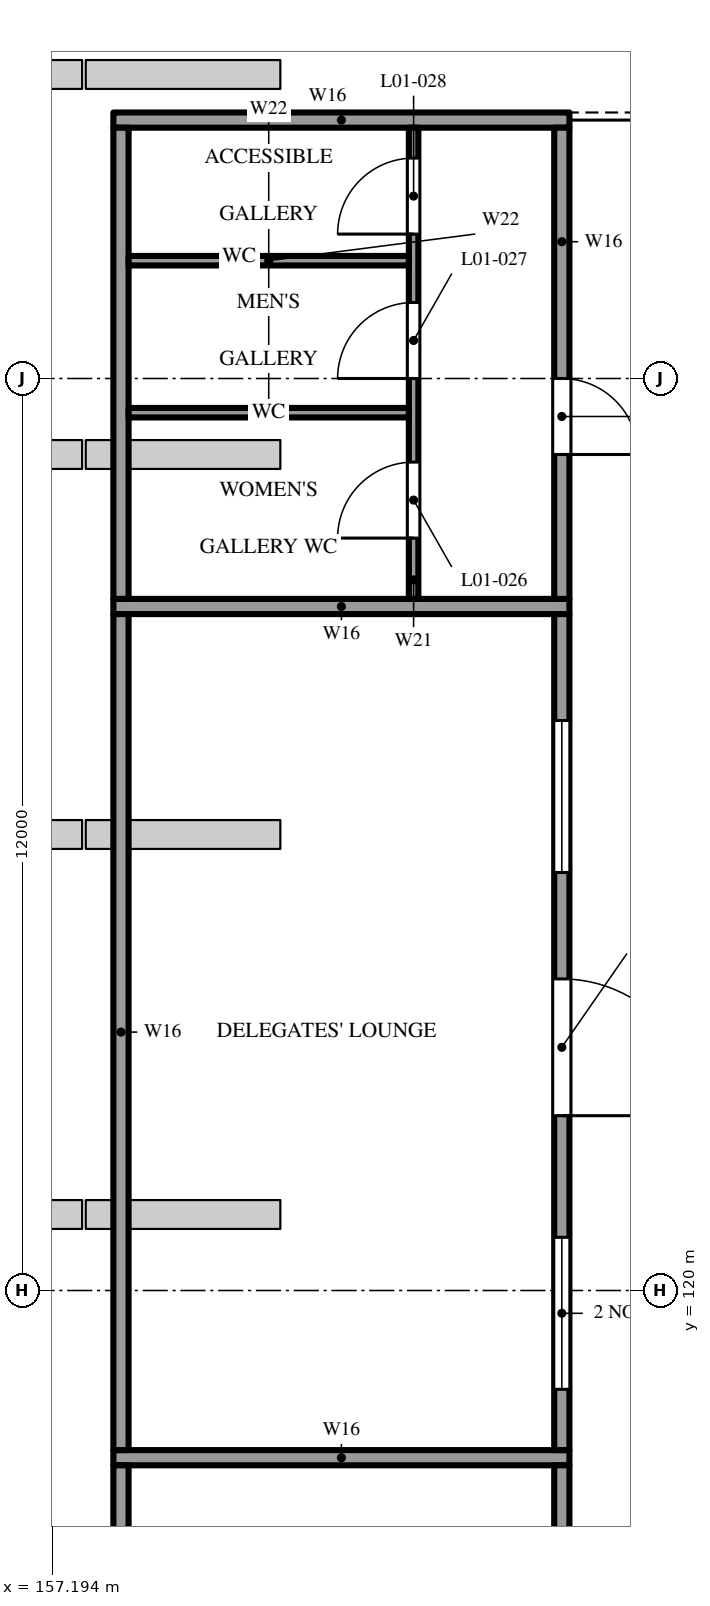
"""IFC4 building model, lengths in metres.
Left out: names, types, materials, properties, quantities, classifications, styles, units other than length and angle.
Written with IfcOpenShell. Run it as: python <this file> out.ifc"""

import sys

from ifc_helpers import new_model, si_unit, direction, frame, frame_2d, origin, place, context, subcontext, project, spatial, rectangle, extrude, element, fill, save


model = new_model("IFC4")
c1 = context("Model", 3, precision=1e-05, world=origin(), true_north=direction((0.0, 1.0)))
c2 = subcontext(c1, "Body", "Model", "MODEL_VIEW")
j1 = project(units=[si_unit("LENGTHUNIT", "METRE"), si_unit("PLANEANGLEUNIT", "RADIAN")], contexts=[c1])
p1 = place(None, origin())
s1 = spatial("IfcSite", under=j1, at=p1, CompositionType="ELEMENT")
p2 = place(p1, origin())
s2 = spatial("IfcBuilding", under=s1, at=p2, CompositionType="ELEMENT")
p3 = place(p2, frame((0.0, 0.0, 7.2)))
s3 = spatial("IfcBuildingStorey", under=s2, at=p3, CompositionType="ELEMENT", Elevation=7.2)
p4 = place(p3, frame((158.0, 117.8, 0.0), z_axis=(0.0, 0.0, 1.0), x_axis=(1.0, 0.0, 0.0)))
e1 = element("IfcWall", 1, at=p4, inside=s3, PredefinedType="SOLIDWALL", context=c2, shape_type="SweptSolid", body=[
    extrude(rectangle(XDim=6.0, YDim=0.2, at=frame_2d((3.0, 0.0))), origin(), (0.0, 0.0, 1.0), 3.4),
])
p5 = place(p3, frame((158.1, 105.4, 0.0), z_axis=(0.0, 0.0, 1.0), x_axis=(0.0, 1.0, 0.0)))
e2 = element("IfcWall", 2, at=p5, inside=s3, PredefinedType="SOLIDWALL", context=c2, shape_type="SweptSolid", body=[
    extrude(rectangle(XDim=12.3, YDim=0.2, at=frame_2d((6.15, 0.0))), origin(), (0.0, 0.0, 1.0), 3.4),
])
p6 = place(p3, frame((163.9, 105.4, 0.0), z_axis=(0.0, 0.0, 1.0), x_axis=(0.0, 1.0, 0.0)))
e3 = element("IfcWall", 3, at=p6, inside=s3, PredefinedType="SOLIDWALL", context=c2, shape_type="SweptSolid", body=[
    extrude(rectangle(XDim=12.3, YDim=0.2, at=frame_2d((6.15, 0.0))), origin(), (0.0, 0.0, 1.0), 3.4),
])
p7 = place(p6, frame((5.5, 0.0, 0.0)))
e4 = element("IfcOpeningElement", 4, at=p7, cuts=e3, PredefinedType="OPENING", context=c2, shape_type="SweptSolid", body=[
    extrude(rectangle(XDim=1.6, YDim=2.4, at=frame_2d((0.8, 1.2))), frame((0.0, 0.11, 0.0), z_axis=(0.0, -1.0, 0.0), x_axis=(1.0, 0.0, 0.0)), (0.0, 0.0, 1.0), 0.22),
])
p8 = place(p6, frame((1.2, 0.0, 1.0)))
e5 = element("IfcOpeningElement", 5, at=p8, cuts=e3, PredefinedType="OPENING", context=c2, shape_type="SweptSolid", body=[
    extrude(rectangle(XDim=2.2, YDim=1.8, at=frame_2d((1.1, 0.9))), frame((0.0, 0.11, 0.0), z_axis=(0.0, -1.0, 0.0), x_axis=(1.0, 0.0, 0.0)), (0.0, 0.0, 1.0), 0.22),
])
p9 = place(p6, frame((9.0, 0.0, 1.0)))
e6 = element("IfcOpeningElement", 6, at=p9, cuts=e3, PredefinedType="OPENING", context=c2, shape_type="SweptSolid", body=[
    extrude(rectangle(XDim=2.2, YDim=1.8, at=frame_2d((1.1, 0.9))), frame((0.0, 0.11, 0.0), z_axis=(0.0, -1.0, 0.0), x_axis=(1.0, 0.0, 0.0)), (0.0, 0.0, 1.0), 0.22),
])
p10 = place(p3, frame((158.0, 129.0, 0.0), z_axis=(0.0, 0.0, 1.0), x_axis=(1.0, 0.0, 0.0)))
e7 = element("IfcWall", 7, at=p10, inside=s3, PredefinedType="SOLIDWALL", context=c2, shape_type="SweptSolid", body=[
    extrude(rectangle(XDim=6.0, YDim=0.2, at=frame_2d((3.0, 0.0))), origin(), (0.0, 0.0, 1.0), 3.4),
])
p11 = place(p3, frame((158.1, 117.9, 0.0), z_axis=(0.0, 0.0, 1.0), x_axis=(0.0, 1.0, 0.0)))
e8 = element("IfcWall", 8, at=p11, inside=s3, PredefinedType="SOLIDWALL", context=c2, shape_type="SweptSolid", body=[
    extrude(rectangle(XDim=11.0, YDim=0.2, at=frame_2d((5.5, 0.0))), origin(), (0.0, 0.0, 1.0), 3.4),
])
p12 = place(p3, frame((163.9, 117.9, 0.0), z_axis=(0.0, 0.0, 1.0), x_axis=(0.0, 1.0, 0.0)))
e9 = element("IfcWall", 9, at=p12, inside=s3, PredefinedType="SOLIDWALL", context=c2, shape_type="SweptSolid", body=[
    extrude(rectangle(XDim=11.0, YDim=0.2, at=frame_2d((5.5, 0.0))), origin(), (0.0, 0.0, 1.0), 3.4),
])
p13 = place(p12, frame((4.4, 0.0, 0.0)))
e10 = element("IfcOpeningElement", 10, at=p13, cuts=e9, PredefinedType="OPENING", context=c2, shape_type="SweptSolid", body=[
    extrude(rectangle(XDim=1.8, YDim=2.4, at=frame_2d((0.9, 1.2))), frame((0.0, 0.11, 0.0), z_axis=(0.0, -1.0, 0.0), x_axis=(1.0, 0.0, 0.0)), (0.0, 0.0, 1.0), 0.22),
])
p14 = place(p12, frame((0.8, 0.0, 1.0)))
e11 = element("IfcOpeningElement", 11, at=p14, cuts=e9, PredefinedType="OPENING", context=c2, shape_type="SweptSolid", body=[
    extrude(rectangle(XDim=2.0, YDim=1.8, at=frame_2d((1.0, 0.9))), frame((0.0, 0.11, 0.0), z_axis=(0.0, -1.0, 0.0), x_axis=(1.0, 0.0, 0.0)), (0.0, 0.0, 1.0), 0.22),
])
p15 = place(p12, frame((7.6, 0.0, 1.0)))
e12 = element("IfcOpeningElement", 12, at=p15, cuts=e9, PredefinedType="OPENING", context=c2, shape_type="SweptSolid", body=[
    extrude(rectangle(XDim=2.0, YDim=1.8, at=frame_2d((1.0, 0.9))), frame((0.0, 0.11, 0.0), z_axis=(0.0, -1.0, 0.0), x_axis=(1.0, 0.0, 0.0)), (0.0, 0.0, 1.0), 0.22),
])
p16 = place(p3, frame((158.0, 135.4, 0.0), z_axis=(0.0, 0.0, 1.0), x_axis=(1.0, 0.0, 0.0)))
e13 = element("IfcWall", 13, at=p16, inside=s3, PredefinedType="SOLIDWALL", context=c2, shape_type="SweptSolid", body=[
    extrude(rectangle(XDim=6.0, YDim=0.2, at=frame_2d((3.0, 0.0))), origin(), (0.0, 0.0, 1.0), 3.4),
])
p17 = place(p3, frame((158.1, 129.1, 0.0), z_axis=(0.0, 0.0, 1.0), x_axis=(0.0, 1.0, 0.0)))
e14 = element("IfcWall", 14, at=p17, inside=s3, PredefinedType="SOLIDWALL", context=c2, shape_type="SweptSolid", body=[
    extrude(rectangle(XDim=6.2, YDim=0.2, at=frame_2d((3.1, 0.0))), origin(), (0.0, 0.0, 1.0), 3.4),
])
p18 = place(p3, frame((163.9, 129.1, 0.0), z_axis=(0.0, 0.0, 1.0), x_axis=(0.0, 1.0, 0.0)))
e15 = element("IfcWall", 15, at=p18, inside=s3, PredefinedType="SOLIDWALL", context=c2, shape_type="SweptSolid", body=[
    extrude(rectangle(XDim=6.2, YDim=0.2, at=frame_2d((3.1, 0.0))), origin(), (0.0, 0.0, 1.0), 3.4),
])
p19 = place(p18, frame((1.9, 0.0, 0.0)))
e16 = element("IfcOpeningElement", 16, at=p19, cuts=e15, PredefinedType="OPENING", context=c2, shape_type="SweptSolid", body=[
    extrude(rectangle(XDim=1.0, YDim=2.1, at=frame_2d((0.5, 1.05))), frame((0.0, 0.11, 0.0), z_axis=(0.0, -1.0, 0.0), x_axis=(1.0, 0.0, 0.0)), (0.0, 0.0, 1.0), 0.22),
])
p20 = place(p3, frame((161.95, 129.1, 0.0), z_axis=(0.0, 0.0, 1.0), x_axis=(0.0, 1.0, 0.0)))
e17 = element("IfcWall", 17, at=p20, inside=s3, PredefinedType="PARTITIONING", context=c2, shape_type="SweptSolid", body=[
    extrude(rectangle(XDim=6.2, YDim=0.125, at=frame_2d((3.1, 0.0))), origin(), (0.0, 0.0, 1.0), 3.4),
])
p21 = place(p20, frame((0.8, 0.0, 0.0)))
e18 = element("IfcOpeningElement", 18, at=p21, cuts=e17, PredefinedType="OPENING", context=c2, shape_type="SweptSolid", body=[
    extrude(rectangle(XDim=1.0, YDim=2.1, at=frame_2d((0.5, 1.05))), frame((0.0, 0.073, 0.0), z_axis=(0.0, -1.0, 0.0), x_axis=(1.0, 0.0, 0.0)), (0.0, 0.0, 1.0), 0.145),
])
p22 = place(p20, frame((2.9, 0.0, 0.0)))
e19 = element("IfcOpeningElement", 19, at=p22, cuts=e17, PredefinedType="OPENING", context=c2, shape_type="SweptSolid", body=[
    extrude(rectangle(XDim=1.0, YDim=2.1, at=frame_2d((0.5, 1.05))), frame((0.0, 0.073, 0.0), z_axis=(0.0, -1.0, 0.0), x_axis=(1.0, 0.0, 0.0)), (0.0, 0.0, 1.0), 0.145),
])
p23 = place(p20, frame((4.8, 0.0, 0.0)))
e20 = element("IfcOpeningElement", 20, at=p23, cuts=e17, PredefinedType="OPENING", context=c2, shape_type="SweptSolid", body=[
    extrude(rectangle(XDim=1.0, YDim=2.1, at=frame_2d((0.5, 1.05))), frame((0.0, 0.073, 0.0), z_axis=(0.0, -1.0, 0.0), x_axis=(1.0, 0.0, 0.0)), (0.0, 0.0, 1.0), 0.145),
])
for number, where, z_axis, x_axis in (
    (21, (158.2, 131.55, 0.0), (0.0, 0.0, 1.0), (1.0, 0.0, 0.0)),
    (22, (158.2, 133.55, 0.0), (0.0, 0.0, 1.0), (1.0, 0.0, 0.0)),
):
    element("IfcWall", number, at=place(p3, frame(where, z_axis=z_axis, x_axis=x_axis)), inside=s3, PredefinedType="PARTITIONING", context=c2, shape_type="SweptSolid", body=[
        extrude(rectangle(XDim=3.688, YDim=0.125, at=frame_2d((1.844, 0.0))), origin(), (0.0, 0.0, 1.0), 3.4),
    ])
p24 = place(p13, frame((1.8, 0.0, 0.0), z_axis=(0.0, 0.0, 1.0), x_axis=(-1.0, 0.0, 0.0)))
e23 = element("IfcDoor", 23, at=p24, inside=s3, OperationType="DOUBLE_DOOR_SINGLE_SWING", PredefinedType="DOOR", context=c2, shape_type="SweptSolid", body=[
    extrude(rectangle(XDim=1.8, YDim=2.4, at=frame_2d((0.9, 1.2))), frame((0.0, 0.025, 0.0), z_axis=(0.0, -1.0, 0.0), x_axis=(1.0, 0.0, 0.0)), (0.0, 0.0, 1.0), 0.05),
])
fill(e10, e23)
p25 = place(p14, origin())
e24 = element("IfcWindow", 24, at=p25, inside=s3, PartitioningType="SINGLE_PANEL", PredefinedType="WINDOW", context=c2, shape_type="SweptSolid", body=[
    extrude(rectangle(XDim=2.0, YDim=1.8, at=frame_2d((1.0, 0.9))), frame((0.0, 0.03, 0.0), z_axis=(0.0, -1.0, 0.0), x_axis=(1.0, 0.0, 0.0)), (0.0, 0.0, 1.0), 0.06),
])
fill(e11, e24)
p26 = place(p15, origin())
e25 = element("IfcWindow", 25, at=p26, inside=s3, PartitioningType="SINGLE_PANEL", PredefinedType="WINDOW", context=c2, shape_type="SweptSolid", body=[
    extrude(rectangle(XDim=2.0, YDim=1.8, at=frame_2d((1.0, 0.9))), frame((0.0, 0.03, 0.0), z_axis=(0.0, -1.0, 0.0), x_axis=(1.0, 0.0, 0.0)), (0.0, 0.0, 1.0), 0.06),
])
fill(e12, e25)
p27 = place(p19, frame((1.0, 0.0, 0.0), z_axis=(0.0, 0.0, 1.0), x_axis=(-1.0, 0.0, 0.0)))
e26 = element("IfcDoor", 26, at=p27, inside=s3, OperationType="SINGLE_SWING_RIGHT", PredefinedType="DOOR", context=c2, shape_type="SweptSolid", body=[
    extrude(rectangle(XDim=1.0, YDim=2.1, at=frame_2d((0.5, 1.05))), frame((0.0, 0.025, 0.0), z_axis=(0.0, -1.0, 0.0), x_axis=(1.0, 0.0, 0.0)), (0.0, 0.0, 1.0), 0.05),
])
fill(e16, e26)
p28 = place(p21, origin())
e27 = element("IfcDoor", 27, at=p28, inside=s3, OperationType="SINGLE_SWING_LEFT", PredefinedType="DOOR", context=c2, shape_type="SweptSolid", body=[
    extrude(rectangle(XDim=1.0, YDim=2.1, at=frame_2d((0.5, 1.05))), frame((0.0, 0.025, 0.0), z_axis=(0.0, -1.0, 0.0), x_axis=(1.0, 0.0, 0.0)), (0.0, 0.0, 1.0), 0.05),
])
fill(e18, e27)
p29 = place(p22, origin())
e28 = element("IfcDoor", 28, at=p29, inside=s3, OperationType="SINGLE_SWING_RIGHT", PredefinedType="DOOR", context=c2, shape_type="SweptSolid", body=[
    extrude(rectangle(XDim=1.0, YDim=2.1, at=frame_2d((0.5, 1.05))), frame((0.0, 0.025, 0.0), z_axis=(0.0, -1.0, 0.0), x_axis=(1.0, 0.0, 0.0)), (0.0, 0.0, 1.0), 0.05),
])
fill(e19, e28)
p30 = place(p23, origin())
e29 = element("IfcDoor", 29, at=p30, inside=s3, OperationType="SINGLE_SWING_LEFT", PredefinedType="DOOR", context=c2, shape_type="SweptSolid", body=[
    extrude(rectangle(XDim=1.0, YDim=2.1, at=frame_2d((0.5, 1.05))), frame((0.0, 0.025, 0.0), z_axis=(0.0, -1.0, 0.0), x_axis=(1.0, 0.0, 0.0)), (0.0, 0.0, 1.0), 0.05),
])
fill(e20, e29)
save(model, sys.argv[1])
